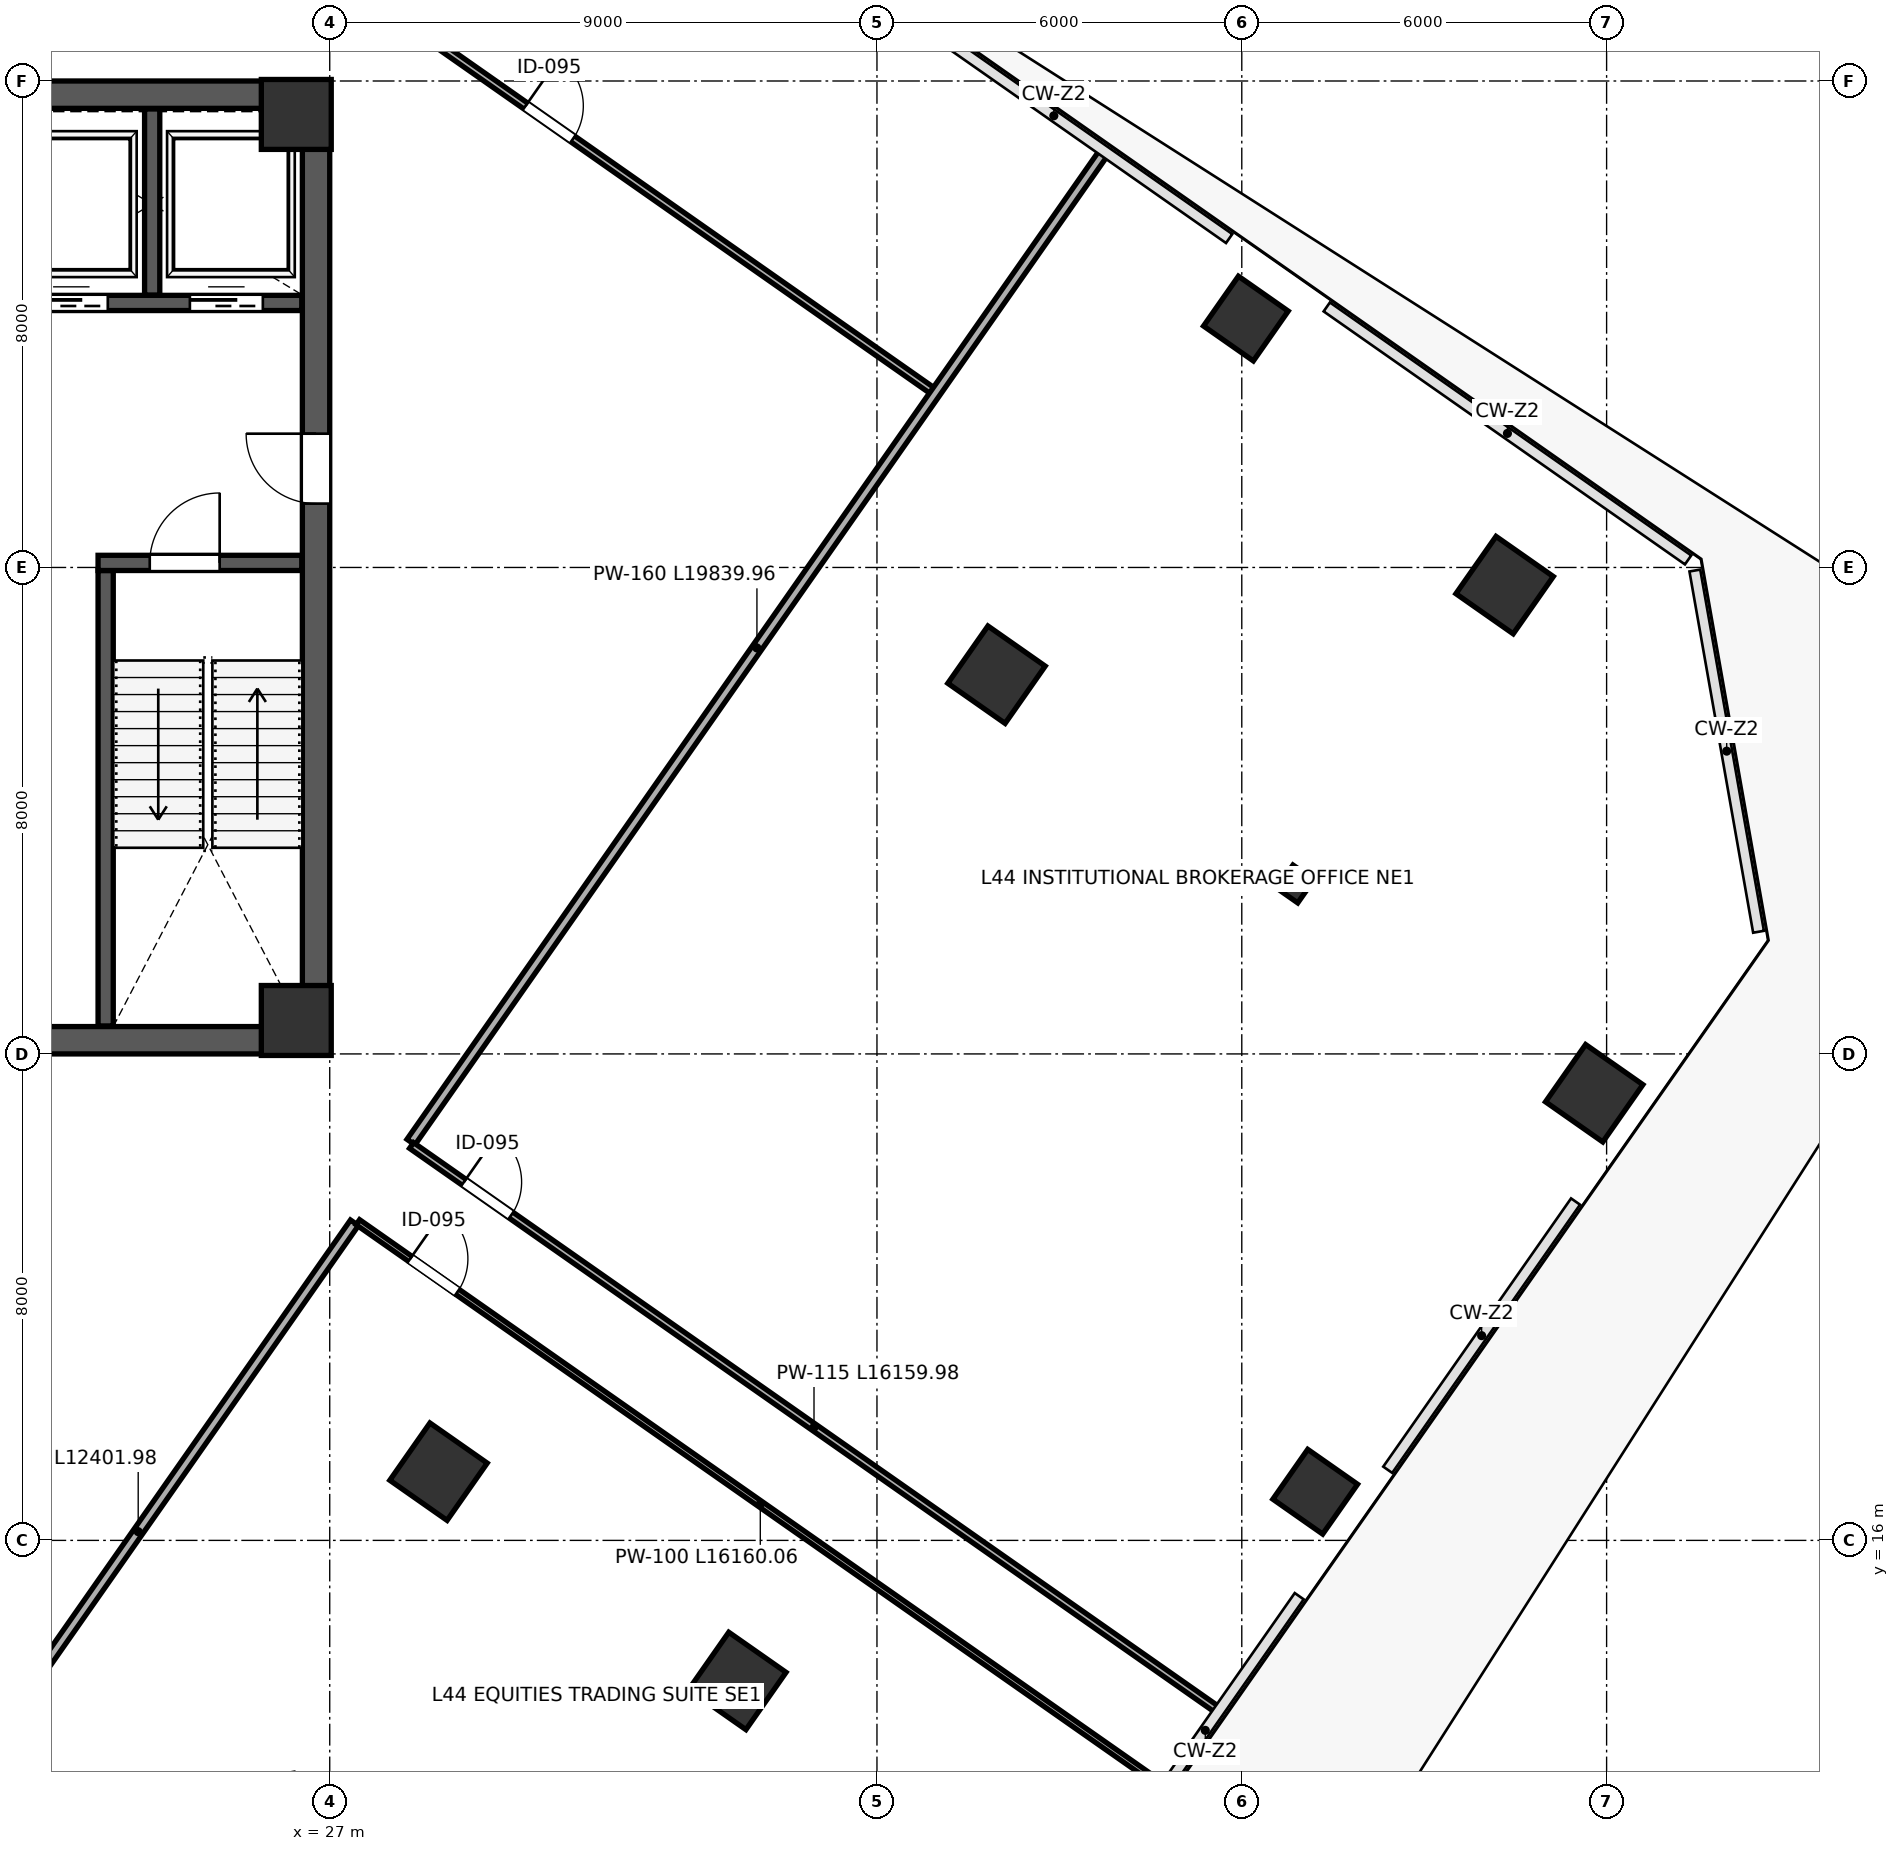
"""IFC4 building model, lengths in metres.
Left out: names, types, materials, properties, quantities, classifications, styles, units other than length and angle.
Written with IfcOpenShell. Run it as: python <this file> out.ifc"""

import sys

from ifc_helpers import new_model, si_unit, direction, frame, frame_2d, origin, origin_2d, place, context, subcontext, project, spatial, rectangle, i_section, extrude, clip, halfspace, source, transform, mapped, element, fill, save


model = new_model("IFC4")
c1 = context("Model", 3, precision=1e-05, world=origin(), true_north=direction((0.0, 1.0)))
c2 = subcontext(c1, "Body", "Model", "MODEL_VIEW")
j1 = project(units=[si_unit("LENGTHUNIT", "METRE"), si_unit("PLANEANGLEUNIT", "RADIAN")], contexts=[c1])
p1 = place(None, origin())
s1 = spatial("IfcSite", under=j1, at=p1, CompositionType="ELEMENT")
p2 = place(p1, origin())
s2 = spatial("IfcBuilding", under=s1, at=p2, CompositionType="ELEMENT")
p3 = place(p2, frame((0.0, 0.0, 196.0)))
s3 = spatial("IfcBuildingStorey", under=s2, at=p3, CompositionType="ELEMENT", Elevation=196.0)
m1 = source(origin(), c2, "Body", "SweptSolid", [
    extrude(rectangle(XDim=1.15, YDim=1.15, at=origin_2d()), origin(), (0.0, 0.0, 1.0), 4.198),
])
for number, where, z_axis, x_axis in (
    (1, (26.45, 24.55, 0.001), (0.0, 0.0, 1.0), (1.0, 0.0, 0.0)),
    (2, (26.45, 39.45, 0.001), (0.0, 0.0, 1.0), (1.0, 0.0, 0.0)),
):
    element("IfcColumn", number, at=place(p3, frame(where, z_axis=z_axis, x_axis=x_axis)), inside=s3, PredefinedType="COLUMN", context=c2, shape_type="MappedRepresentation", body=[
        mapped(m1, transform((0.0, 0.0, 0.0), scale=1.0)),
    ])
p4 = place(p3, frame((34.695, 41.256, 0.0), z_axis=(0.047152209171, -0.068874664255, 0.996510386195), x_axis=(-0.998813718494, 0.008891928964, 0.047875769947)))
e3 = element("IfcColumn", 3, at=p4, inside=s3, PredefinedType="COLUMN", context=c2, shape_type="Clipping", body=[
    clip(clip(extrude(rectangle(XDim=1.0, YDim=1.0, at=origin_2d()), origin(), (0.0, 0.0, 1.0), 4.215), halfspace(frame((0.0, 0.0, 0.059), z_axis=(0.0, 0.0, -1.0), x_axis=(1.0, 0.0, 0.0)), False)), halfspace(frame((0.0, 0.0, 4.156), z_axis=(0.0, 0.0, 1.0), x_axis=(1.0, 0.0, 0.0)), False)),
])
p5 = place(p3, frame((28.789, 17.13, 0.0), z_axis=(-0.077375189138, -0.036834296625, 0.996321391268), x_axis=(0.163888057294, 0.985253625304, 0.049152807664)))
e4 = element("IfcColumn", 4, at=p5, inside=s3, PredefinedType="COLUMN", context=c2, shape_type="Clipping", body=[
    clip(clip(extrude(rectangle(XDim=1.15, YDim=1.15, at=origin_2d()), origin(), (0.0, 0.0, 1.0), 4.216), halfspace(frame((0.0, 0.0, 0.07), z_axis=(0.0, 0.0, -1.0), x_axis=(1.0, 0.0, 0.0)), False)), halfspace(frame((0.0, 0.0, 4.146), z_axis=(0.0, 0.0, 1.0), x_axis=(1.0, 0.0, 0.0)), False)),
])
p6 = place(p3, frame((37.966, 30.236, 0.0), z_axis=(-0.010077327088, -0.085078123516, 0.996323321205), x_axis=(-0.746246245423, 0.663853754889, 0.049139936013)))
e5 = element("IfcColumn", 5, at=p6, inside=s3, PredefinedType="COLUMN", context=c2, shape_type="Clipping", body=[
    clip(clip(extrude(rectangle(XDim=1.15, YDim=1.15, at=origin_2d()), origin(), (0.0, 0.0, 1.0), 4.215), halfspace(frame((0.0, 0.0, 0.07), z_axis=(0.0, 0.0, -1.0), x_axis=(1.0, 0.0, 0.0)), False)), halfspace(frame((0.0, 0.0, 4.146), z_axis=(0.0, 0.0, 1.0), x_axis=(1.0, 0.0, 0.0)), False)),
])
p7 = place(p3, frame((42.067, 36.093, 0.0), z_axis=(0.019994459552, -0.106444492759, 0.994117594427), x_axis=(-0.910337692631, 0.409177424766, 0.062121819338)))
e6 = element("IfcColumn", 6, at=p7, inside=s3, PredefinedType="COLUMN", context=c2, shape_type="Clipping", body=[
    clip(clip(extrude(rectangle(XDim=1.0, YDim=1.0, at=origin_2d()), origin(), (0.0, 0.0, 1.0), 4.225), halfspace(frame((0.0, 0.0, 0.077), z_axis=(0.0, 0.0, -1.0), x_axis=(1.0, 0.0, 0.0)), False)), halfspace(frame((0.0, 0.0, 4.148), z_axis=(0.0, 0.0, 1.0), x_axis=(1.0, 0.0, 0.0)), False)),
])
p8 = place(p3, frame((33.704, 13.688, 0.0), z_axis=(-0.095234628141, -0.061968924194, 0.993524140641), x_axis=(0.03088004258, 0.997396227548, 0.065170455291)))
e7 = element("IfcColumn", 7, at=p8, inside=s3, PredefinedType="COLUMN", context=c2, shape_type="Clipping", body=[
    clip(clip(extrude(rectangle(XDim=1.15, YDim=1.15, at=origin_2d()), origin(), (0.0, 0.0, 1.0), 4.227), halfspace(frame((0.0, 0.0, 0.092), z_axis=(0.0, 0.0, -1.0), x_axis=(1.0, 0.0, 0.0)), False)), halfspace(frame((0.0, 0.0, 4.135), z_axis=(0.0, 0.0, 1.0), x_axis=(1.0, 0.0, 0.0)), False)),
])
p9 = place(p3, frame((42.881, 26.795, 0.0), z_axis=(-0.028010300082, -0.110077591661, 0.993528231558), x_axis=(-0.653325014586, 0.75426912398, 0.065149934211)))
e8 = element("IfcColumn", 8, at=p9, inside=s3, PredefinedType="COLUMN", context=c2, shape_type="Clipping", body=[
    clip(clip(extrude(i_section(OverallWidth=0.421, OverallDepth=0.465, WebThickness=0.045, FlangeThickness=0.072, FilletRadius=0.015, at=origin_2d()), origin(), (0.0, 0.0, 1.0), 4.227), halfspace(frame((0.0, 0.0, 0.036), z_axis=(0.0, 0.0, -1.0), x_axis=(1.0, 0.0, 0.0)), False)), halfspace(frame((0.0, 0.0, 4.191), z_axis=(0.0, 0.0, 1.0), x_axis=(1.0, 0.0, 0.0)), False)),
])
p10 = place(p3, frame((46.323, 31.71, 0.0), z_axis=(-0.002940270602, -0.127815292631, 0.99179363064), x_axis=(-0.805852542402, 0.587557835307, 0.07333123532)))
e9 = element("IfcColumn", 9, at=p10, inside=s3, PredefinedType="COLUMN", context=c2, shape_type="Clipping", body=[
    clip(clip(extrude(rectangle(XDim=1.15, YDim=1.15, at=origin_2d()), origin(), (0.0, 0.0, 1.0), 4.235), halfspace(frame((0.0, 0.0, 0.104), z_axis=(0.0, 0.0, -1.0), x_axis=(1.0, 0.0, 0.0)), False)), halfspace(frame((0.0, 0.0, 4.131), z_axis=(0.0, 0.0, 1.0), x_axis=(1.0, 0.0, 0.0)), False)),
])
p11 = place(p3, frame((43.208, 16.8, 0.0), z_axis=(-0.079411656934, -0.110853835822, 0.990658980592), x_axis=(-0.33501070379, 0.938962369658, 0.078214427778)))
e10 = element("IfcColumn", 10, at=p11, inside=s3, PredefinedType="COLUMN", context=c2, shape_type="Clipping", body=[
    clip(clip(extrude(rectangle(XDim=1.0, YDim=1.0, at=origin_2d()), origin(), (0.0, 0.0, 1.0), 4.24), halfspace(frame((0.0, 0.0, 0.097), z_axis=(0.0, 0.0, -1.0), x_axis=(1.0, 0.0, 0.0)), False)), halfspace(frame((0.0, 0.0, 4.143), z_axis=(0.0, 0.0, 1.0), x_axis=(1.0, 0.0, 0.0)), False)),
])
p12 = place(p3, frame((47.796, 23.354, 0.0), z_axis=(-0.045915156715, -0.134695967257, 0.989822607738), x_axis=(-0.592162125204, 0.801674232418, 0.081623786675)))
e11 = element("IfcColumn", 11, at=p12, inside=s3, PredefinedType="COLUMN", context=c2, shape_type="Clipping", body=[
    clip(clip(extrude(rectangle(XDim=1.15, YDim=1.15, at=origin_2d()), origin(), (0.0, 0.0, 1.0), 4.243), halfspace(frame((0.0, 0.0, 0.116), z_axis=(0.0, 0.0, -1.0), x_axis=(1.0, 0.0, 0.0)), False)), halfspace(frame((0.0, 0.0, 4.127), z_axis=(0.0, 0.0, 1.0), x_axis=(1.0, 0.0, 0.0)), False)),
])
p13 = place(p3, frame((26.775, 24.45, 0.0), z_axis=(0.0, 0.0, 1.0), x_axis=(0.0, 1.0, 0.0)))
e12 = element("IfcWall", 12, at=p13, inside=s3, PredefinedType="SHEAR", context=c2, shape_type="SweptSolid", body=[
    extrude(rectangle(XDim=15.1, YDim=0.45, at=frame_2d((7.55, 0.0))), origin(), (0.0, 0.0, 1.0), 3.96),
])
p14 = place(p13, frame((8.6, 0.0, 0.0)))
e13 = element("IfcOpeningElement", 13, at=p14, cuts=e12, PredefinedType="OPENING", context=c2, shape_type="SweptSolid", body=[
    extrude(rectangle(XDim=1.15, YDim=2.2, at=frame_2d((0.575, 1.1))), frame((0.0, 0.235, 0.0), z_axis=(0.0, -1.0, 0.0), x_axis=(1.0, 0.0, 0.0)), (0.0, 0.0, 1.0), 0.47),
])
for number, where, z_axis, x_axis in (
    (14, (9.0, 24.225, 0.0), (0.0, 0.0, 1.0), (1.0, 0.0, 0.0)),
    (15, (9.0, 39.775, 0.0), (0.0, 0.0, 1.0), (1.0, 0.0, 0.0)),
):
    element("IfcWall", number, at=place(p3, frame(where, z_axis=z_axis, x_axis=x_axis)), inside=s3, PredefinedType="SHEAR", context=c2, shape_type="SweptSolid", body=[
        extrude(rectangle(XDim=18.0, YDim=0.45, at=frame_2d((9.0, 0.0))), origin(), (0.0, 0.0, 1.0), 3.96),
    ])
p15 = place(p3, frame((23.315, 24.46, 0.0), z_axis=(0.0, 0.0, 1.0), x_axis=(0.0, 1.0, 0.0)))
e16 = element("IfcWall", 16, at=p15, inside=s3, PredefinedType="SHEAR", context=c2, shape_type="SweptSolid", body=[
    extrude(rectangle(XDim=7.49, YDim=0.25, at=frame_2d((3.745, 0.0))), origin(), (0.0, 0.0, 1.0), 3.96),
])
p16 = place(p3, frame((23.19, 32.075, 0.0), z_axis=(0.0, 0.0, 1.0), x_axis=(1.0, 0.0, 0.0)))
e17 = element("IfcWall", 17, at=p16, inside=s3, PredefinedType="SHEAR", context=c2, shape_type="SweptSolid", body=[
    extrude(rectangle(XDim=3.35, YDim=0.25, at=frame_2d((1.675, 0.0))), origin(), (0.0, 0.0, 1.0), 3.96),
])
p17 = place(p16, frame((0.85, 0.0, 0.0)))
e18 = element("IfcOpeningElement", 18, at=p17, cuts=e17, PredefinedType="OPENING", context=c2, shape_type="SweptSolid", body=[
    extrude(rectangle(XDim=1.15, YDim=2.2, at=frame_2d((0.575, 1.1))), frame((0.0, 0.135, 0.0), z_axis=(0.0, -1.0, 0.0), x_axis=(1.0, 0.0, 0.0)), (0.0, 0.0, 1.0), 0.27),
])
p18 = place(p3, frame((21.45, 36.35, 0.0), z_axis=(0.0, 0.0, 1.0), x_axis=(1.0, 0.0, 0.0)))
e19 = element("IfcWall", 19, at=p18, inside=s3, PredefinedType="SHEAR", context=c2, shape_type="SweptSolid", body=[
    extrude(rectangle(XDim=5.09, YDim=0.25, at=frame_2d((2.545, 0.0))), origin(), (0.0, 0.0, 1.0), 3.96),
])
p19 = place(p18, frame((0.7, 0.0, 0.0)))
e20 = element("IfcOpeningElement", 20, at=p19, cuts=e19, PredefinedType="OPENING", context=c2, shape_type="SweptSolid", body=[
    extrude(rectangle(XDim=1.2, YDim=2.2, at=frame_2d((0.6, 1.1))), frame((0.0, 0.135, 0.0), z_axis=(0.0, -1.0, 0.0), x_axis=(1.0, 0.0, 0.0)), (0.0, 0.0, 1.0), 0.27),
])
p20 = place(p18, frame((3.25, 0.0, 0.0)))
e21 = element("IfcOpeningElement", 21, at=p20, cuts=e19, PredefinedType="OPENING", context=c2, shape_type="SweptSolid", body=[
    extrude(rectangle(XDim=1.2, YDim=2.2, at=frame_2d((0.6, 1.1))), frame((0.0, 0.135, 0.0), z_axis=(0.0, -1.0, 0.0), x_axis=(1.0, 0.0, 0.0)), (0.0, 0.0, 1.0), 0.27),
])
p21 = place(p3, frame((24.08, 36.48, 0.0), z_axis=(0.0, 0.0, 1.0), x_axis=(0.0, 1.0, 0.0)))
e22 = element("IfcWall", 22, at=p21, inside=s3, PredefinedType="SHEAR", context=c2, shape_type="SweptSolid", body=[
    extrude(rectangle(XDim=3.06, YDim=0.25, at=frame_2d((1.53, 0.0))), origin(), (0.0, 0.0, 1.0), 3.96),
])
p22 = place(p3, frame((14.821, 50.374, 0.0), z_axis=(0.0, 0.0, 1.0), x_axis=(0.819153719849, -0.573574043396, 0.0)))
e23 = element("IfcWall", 23, at=p22, inside=s3, PredefinedType="PARTITIONING", context=c2, shape_type="SweptSolid", body=[
    extrude(rectangle(XDim=26.99, YDim=0.115, at=frame_2d((13.495, 0.0))), origin(), (0.0, 0.0, 1.0), 3.96),
])
p23 = place(p22, frame((18.8, 0.0, 0.0)))
e24 = element("IfcOpeningElement", 24, at=p23, cuts=e23, PredefinedType="OPENING", context=c2, shape_type="SweptSolid", body=[
    extrude(rectangle(XDim=0.95, YDim=2.15, at=frame_2d((0.475, 1.075))), frame((0.0, 0.067, 0.0), z_axis=(0.0, -1.0, 0.0), x_axis=(1.0, 0.0, 0.0)), (0.0, 0.0, 1.0), 0.135),
])
p24 = place(p3, frame((28.336, 22.55, 0.0), z_axis=(0.0, 0.0, 1.0), x_axis=(0.573581263398, 0.819148664333, 0.0)))
e25 = element("IfcWall", 25, at=p24, inside=s3, PredefinedType="PARTITIONING", context=c2, shape_type="SweptSolid", body=[
    extrude(rectangle(XDim=19.84, YDim=0.16, at=frame_2d((9.92, 0.0))), origin(), (0.0, 0.0, 1.0), 3.195),
])
p25 = place(p3, frame((20.293, 11.064, 0.0), z_axis=(0.0, 0.0, 1.0), x_axis=(0.573585209026, 0.819145901526, 0.0)))
e26 = element("IfcWall", 26, at=p25, inside=s3, PredefinedType="PARTITIONING", context=c2, shape_type="SweptSolid", body=[
    extrude(rectangle(XDim=12.402, YDim=0.16, at=frame_2d((6.201, 0.0))), origin(), (0.0, 0.0, 1.0), 3.96),
])
p26 = place(p3, frame((28.346, 22.494, 0.0), z_axis=(0.0, 0.0, 1.0), x_axis=(0.819146739804, -0.573584011866, 0.0)))
e27 = element("IfcWall", 27, at=p26, inside=s3, PredefinedType="PARTITIONING", context=c2, shape_type="SweptSolid", body=[
    extrude(rectangle(XDim=16.16, YDim=0.115, at=frame_2d((8.08, 0.0))), origin(), (0.0, 0.0, 1.0), 3.96),
])
p27 = place(p26, frame((1.05, 0.0, 0.0)))
e28 = element("IfcOpeningElement", 28, at=p27, cuts=e27, PredefinedType="OPENING", context=c2, shape_type="SweptSolid", body=[
    extrude(rectangle(XDim=0.95, YDim=2.15, at=frame_2d((0.475, 1.075))), frame((0.0, 0.067, 0.0), z_axis=(0.0, -1.0, 0.0), x_axis=(1.0, 0.0, 0.0)), (0.0, 0.0, 1.0), 0.135),
])
p28 = place(p3, frame((27.462, 21.233, 0.0), z_axis=(0.0, 0.0, 1.0), x_axis=(0.819151710168, -0.573576913525, 0.0)))
e29 = element("IfcWall", 29, at=p28, inside=s3, PredefinedType="PARTITIONING", context=c2, shape_type="SweptSolid", body=[
    extrude(rectangle(XDim=16.16, YDim=0.1, at=frame_2d((8.08, 0.0))), origin(), (0.0, 0.0, 1.0), 3.96),
])
p29 = place(p28, frame((1.05, 0.0, 0.0)))
e30 = element("IfcOpeningElement", 30, at=p29, cuts=e29, PredefinedType="OPENING", context=c2, shape_type="SweptSolid", body=[
    extrude(rectangle(XDim=0.95, YDim=2.15, at=frame_2d((0.475, 1.075))), frame((0.0, 0.06, 0.0), z_axis=(0.0, -1.0, 0.0), x_axis=(1.0, 0.0, 0.0)), (0.0, 0.0, 1.0), 0.12),
])
m2 = source(origin(), c2, "Body", "SweptSolid", [
    extrude(rectangle(XDim=1.15, YDim=2.2, at=frame_2d((0.575, 1.1))), frame((0.0, 0.025, 0.0), z_axis=(0.0, -1.0, 0.0), x_axis=(1.0, 0.0, 0.0)), (0.0, 0.0, 1.0), 0.05),
])
p30 = place(p17, origin())
e31 = element("IfcDoor", 31, at=p30, inside=s3, OperationType="SINGLE_SWING_RIGHT", PredefinedType="DOOR", context=c2, shape_type="MappedRepresentation", body=[
    mapped(m2, transform((0.0, 0.0, 0.0), scale=1.0)),
])
fill(e18, e31)
m3 = source(origin(), c2, "Body", "SweptSolid", [
    extrude(rectangle(XDim=1.15, YDim=2.2, at=frame_2d((0.575, 1.1))), frame((0.0, 0.025, 0.0), z_axis=(0.0, -1.0, 0.0), x_axis=(1.0, 0.0, 0.0)), (0.0, 0.0, 1.0), 0.05),
])
p31 = place(p14, origin())
e32 = element("IfcDoor", 32, at=p31, inside=s3, OperationType="SINGLE_SWING_RIGHT", PredefinedType="DOOR", context=c2, shape_type="MappedRepresentation", body=[
    mapped(m3, transform((0.0, 0.0, 0.0), scale=1.0)),
])
fill(e13, e32)
m4 = source(origin(), c2, "Body", "SweptSolid", [
    extrude(rectangle(XDim=1.2, YDim=2.2, at=frame_2d((0.6, 1.1))), frame((0.0, 0.025, 0.0), z_axis=(0.0, -1.0, 0.0), x_axis=(1.0, 0.0, 0.0)), (0.0, 0.0, 1.0), 0.05),
])
p32 = place(p19, origin())
e33 = element("IfcDoor", 33, at=p32, inside=s3, OperationType="SLIDING_TO_LEFT", PredefinedType="DOOR", context=c2, shape_type="MappedRepresentation", body=[
    mapped(m4, transform((0.0, 0.0, 0.0), scale=1.0)),
])
fill(e20, e33)
p33 = place(p20, origin())
e34 = element("IfcDoor", 34, at=p33, inside=s3, OperationType="SLIDING_TO_RIGHT", PredefinedType="DOOR", context=c2, shape_type="MappedRepresentation", body=[
    mapped(m4, transform((0.0, 0.0, 0.0), scale=1.0)),
])
fill(e21, e34)
m5 = source(origin(), c2, "Body", "SweptSolid", [
    extrude(rectangle(XDim=0.95, YDim=2.15, at=frame_2d((0.475, 1.075))), frame((0.0, 0.025, 0.0), z_axis=(0.0, -1.0, 0.0), x_axis=(1.0, 0.0, 0.0)), (0.0, 0.0, 1.0), 0.05),
])
p34 = place(p23, origin())
e35 = element("IfcDoor", 35, at=p34, inside=s3, OperationType="SINGLE_SWING_LEFT", PredefinedType="DOOR", context=c2, shape_type="MappedRepresentation", body=[
    mapped(m5, transform((0.0, 0.0, 0.0), scale=1.0)),
])
fill(e24, e35)
p35 = place(p27, origin())
e36 = element("IfcDoor", 36, at=p35, inside=s3, OperationType="SINGLE_SWING_LEFT", PredefinedType="DOOR", context=c2, shape_type="MappedRepresentation", body=[
    mapped(m5, transform((0.0, 0.0, 0.0), scale=1.0)),
])
fill(e28, e36)
p36 = place(p29, origin())
e37 = element("IfcDoor", 37, at=p36, inside=s3, OperationType="SINGLE_SWING_LEFT", PredefinedType="DOOR", context=c2, shape_type="MappedRepresentation", body=[
    mapped(m5, transform((0.0, 0.0, 0.0), scale=1.0)),
])
fill(e30, e37)
save(model, sys.argv[1])
